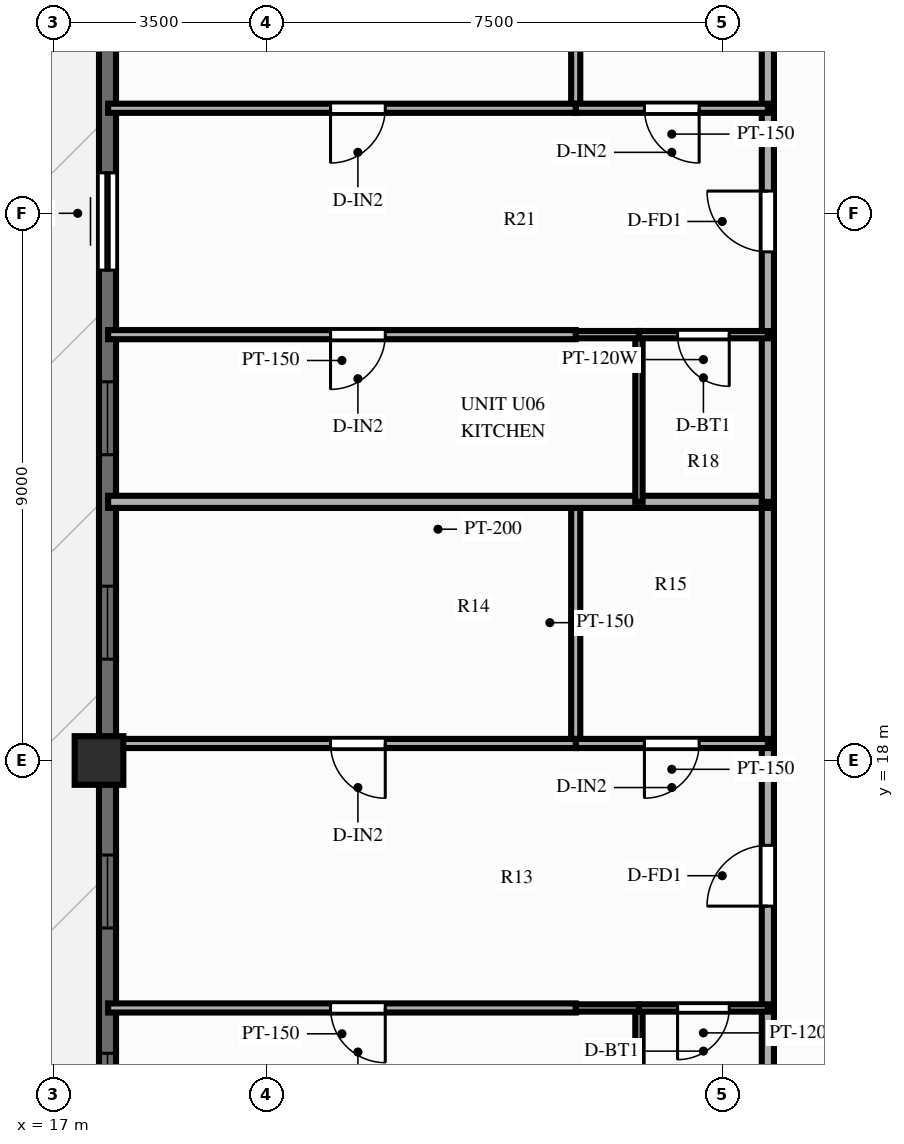
"""IFC4 building model, lengths in metres.
Left out: names, types, materials, properties, quantities, classifications, styles, units other than length and angle.
Written with IfcOpenShell. Run it as: python <this file> out.ifc"""

import sys

from ifc_helpers import new_model, si_unit, direction, frame, frame_2d, origin, origin_2d, place, context, subcontext, project, spatial, rectangle, extrude, source, transform, mapped, element, fill, save


model = new_model("IFC4")
c1 = context("Model", 3, precision=1e-05, world=origin(), true_north=direction((0.0, 1.0)))
c2 = subcontext(c1, "Body", "Model", "MODEL_VIEW")
j1 = project(units=[si_unit("LENGTHUNIT", "METRE"), si_unit("PLANEANGLEUNIT", "RADIAN")], contexts=[c1])
p1 = place(None, origin())
s1 = spatial("IfcSite", under=j1, at=p1, CompositionType="ELEMENT")
p2 = place(p1, origin())
s2 = spatial("IfcBuilding", under=s1, at=p2, CompositionType="ELEMENT")
p3 = place(p2, frame((0.0, 0.0, 179.8)))
s3 = spatial("IfcBuildingStorey", under=s2, at=p3, CompositionType="ELEMENT", Elevation=179.8)
m1 = source(origin(), c2, "Body", "SweptSolid", [
    extrude(rectangle(XDim=0.8, YDim=0.8, at=origin_2d()), origin(), (0.0, 0.0, 1.0), 3.0),
])
p4 = place(p3, frame((17.75, 18.0, 0.0), z_axis=(0.0, 0.0, 1.0), x_axis=(1.0, 0.0, 0.0)))
e1 = element("IfcColumn", 1, at=p4, inside=s3, PredefinedType="COLUMN", context=c2, shape_type="MappedRepresentation", body=[
    mapped(m1, transform((0.0, 0.0, 0.0), scale=1.0)),
])
p5 = place(p3, frame((17.89, 11.0, 0.0), z_axis=(0.0, 0.0, 1.0), x_axis=(0.0, 1.0, 0.0)))
e2 = element("IfcWall", 2, at=p5, inside=s3, PredefinedType="SOLIDWALL", context=c2, shape_type="SweptSolid", body=[
    extrude(rectangle(XDim=32.0, YDim=0.28, at=frame_2d((16.0, 0.0))), origin(), (0.0, 0.0, 1.0), 2.28),
])
p6 = place(p5, frame((0.985, 0.0, 0.25)))
e3 = element("IfcOpeningElement", 3, at=p6, cuts=e2, PredefinedType="OPENING", context=c2, shape_type="SweptSolid", body=[
    extrude(rectangle(XDim=1.2, YDim=1.5, at=frame_2d((0.6, 0.75))), frame((0.0, 0.152, 0.0), z_axis=(0.0, -1.0, 0.0), x_axis=(1.0, 0.0, 0.0)), (0.0, 0.0, 1.0), 0.304),
])
p7 = place(p5, frame((4.245, 0.0, 0.25)))
e4 = element("IfcOpeningElement", 4, at=p7, cuts=e2, PredefinedType="OPENING", context=c2, shape_type="SweptSolid", body=[
    extrude(rectangle(XDim=1.2, YDim=1.5, at=frame_2d((0.6, 0.75))), frame((0.0, 0.152, 0.0), z_axis=(0.0, -1.0, 0.0), x_axis=(1.0, 0.0, 0.0)), (0.0, 0.0, 1.0), 0.304),
])
p8 = place(p5, frame((8.667, 0.0, 0.25)))
e5 = element("IfcOpeningElement", 5, at=p8, cuts=e2, PredefinedType="OPENING", context=c2, shape_type="SweptSolid", body=[
    extrude(rectangle(XDim=1.2, YDim=1.5, at=frame_2d((0.6, 0.75))), frame((0.0, 0.152, 0.0), z_axis=(0.0, -1.0, 0.0), x_axis=(1.0, 0.0, 0.0)), (0.0, 0.0, 1.0), 0.304),
])
p9 = place(p5, frame((12.029, 0.0, 0.25)))
e6 = element("IfcOpeningElement", 6, at=p9, cuts=e2, PredefinedType="OPENING", context=c2, shape_type="SweptSolid", body=[
    extrude(rectangle(XDim=1.2, YDim=1.5, at=frame_2d((0.6, 0.75))), frame((0.0, 0.152, 0.0), z_axis=(0.0, -1.0, 0.0), x_axis=(1.0, 0.0, 0.0)), (0.0, 0.0, 1.0), 0.304),
])
p10 = place(p5, frame((15.066, 0.0, 0.0)))
e7 = element("IfcOpeningElement", 7, at=p10, cuts=e2, PredefinedType="OPENING", context=c2, shape_type="SweptSolid", body=[
    extrude(rectangle(XDim=1.6, YDim=2.15, at=frame_2d((0.8, 1.075))), frame((0.0, 0.152, 0.0), z_axis=(0.0, -1.0, 0.0), x_axis=(1.0, 0.0, 0.0)), (0.0, 0.0, 1.0), 0.304),
])
p11 = place(p5, frame((19.111, 0.0, 0.25)))
e8 = element("IfcOpeningElement", 8, at=p11, cuts=e2, PredefinedType="OPENING", context=c2, shape_type="SweptSolid", body=[
    extrude(rectangle(XDim=1.2, YDim=1.5, at=frame_2d((0.6, 0.75))), frame((0.0, 0.152, 0.0), z_axis=(0.0, -1.0, 0.0), x_axis=(1.0, 0.0, 0.0)), (0.0, 0.0, 1.0), 0.304),
])
p12 = place(p5, frame((22.47, 0.0, 0.25)))
e9 = element("IfcOpeningElement", 9, at=p12, cuts=e2, PredefinedType="OPENING", context=c2, shape_type="SweptSolid", body=[
    extrude(rectangle(XDim=1.2, YDim=1.5, at=frame_2d((0.6, 0.75))), frame((0.0, 0.152, 0.0), z_axis=(0.0, -1.0, 0.0), x_axis=(1.0, 0.0, 0.0)), (0.0, 0.0, 1.0), 0.304),
])
p13 = place(p5, frame((26.006, 0.0, 0.25)))
e10 = element("IfcOpeningElement", 10, at=p13, cuts=e2, PredefinedType="OPENING", context=c2, shape_type="SweptSolid", body=[
    extrude(rectangle(XDim=1.2, YDim=1.5, at=frame_2d((0.6, 0.75))), frame((0.0, 0.152, 0.0), z_axis=(0.0, -1.0, 0.0), x_axis=(1.0, 0.0, 0.0)), (0.0, 0.0, 1.0), 0.304),
])
p14 = place(p5, frame((29.266, 0.0, 0.25)))
e11 = element("IfcOpeningElement", 11, at=p14, cuts=e2, PredefinedType="OPENING", context=c2, shape_type="SweptSolid", body=[
    extrude(rectangle(XDim=1.2, YDim=1.5, at=frame_2d((0.6, 0.75))), frame((0.0, 0.152, 0.0), z_axis=(0.0, -1.0, 0.0), x_axis=(1.0, 0.0, 0.0)), (0.0, 0.0, 1.0), 0.304),
])
p15 = place(p3, frame((28.75, 11.18, 0.0), z_axis=(0.0, 0.0, 1.0), x_axis=(0.0, 1.0, 0.0)))
e12 = element("IfcWall", 12, at=p15, inside=s3, PredefinedType="PARTITIONING", context=c2, shape_type="SweptSolid", body=[
    extrude(rectangle(XDim=2.75, YDim=0.2, at=frame_2d((1.375, 0.0))), origin(), (0.0, 0.0, 1.0), 2.79),
])
p16 = place(p3, frame((28.75, 13.93, 0.0), z_axis=(0.0, 0.0, 1.0), x_axis=(0.0, 1.0, 0.0)))
e13 = element("IfcWall", 13, at=p16, inside=s3, PredefinedType="PARTITIONING", context=c2, shape_type="SweptSolid", body=[
    extrude(rectangle(XDim=4.35, YDim=0.2, at=frame_2d((2.175, 0.0))), origin(), (0.0, 0.0, 1.0), 2.79),
])
p17 = place(p16, frame((1.675, 0.0, 0.0)))
e14 = element("IfcOpeningElement", 14, at=p17, cuts=e13, PredefinedType="OPENING", context=c2, shape_type="SweptSolid", body=[
    extrude(rectangle(XDim=1.0, YDim=2.15, at=frame_2d((0.5, 1.075))), frame((0.0, 0.112, 0.0), z_axis=(0.0, -1.0, 0.0), x_axis=(1.0, 0.0, 0.0)), (0.0, 0.0, 1.0), 0.224),
])
p18 = place(p3, frame((28.75, 18.28, 0.0), z_axis=(0.0, 0.0, 1.0), x_axis=(0.0, 1.0, 0.0)))
e15 = element("IfcWall", 15, at=p18, inside=s3, PredefinedType="PARTITIONING", context=c2, shape_type="SweptSolid", body=[
    extrude(rectangle(XDim=3.974, YDim=0.2, at=frame_2d((1.987, 0.0))), origin(), (0.0, 0.0, 1.0), 2.79),
])
p19 = place(p3, frame((26.63, 11.18, 0.0), z_axis=(0.0, 0.0, 1.0), x_axis=(0.0, 1.0, 0.0)))
e16 = element("IfcWall", 16, at=p19, inside=s3, PredefinedType="PARTITIONING", context=c2, shape_type="SweptSolid", body=[
    extrude(rectangle(XDim=2.75, YDim=0.12, at=frame_2d((1.375, 0.0))), origin(), (0.0, 0.0, 1.0), 2.79),
])
p20 = place(p3, frame((25.59, 18.28, 0.0), z_axis=(0.0, 0.0, 1.0), x_axis=(0.0, 1.0, 0.0)))
e17 = element("IfcWall", 17, at=p20, inside=s3, PredefinedType="PARTITIONING", context=c2, shape_type="SweptSolid", body=[
    extrude(rectangle(XDim=3.974, YDim=0.15, at=frame_2d((1.987, 0.0))), origin(), (0.0, 0.0, 1.0), 2.79),
])
p21 = place(p3, frame((28.75, 13.93, 0.0), z_axis=(0.0, 0.0, 1.0), x_axis=(-1.0, 0.0, 0.0)))
e18 = element("IfcWall", 18, at=p21, inside=s3, PredefinedType="PARTITIONING", context=c2, shape_type="SweptSolid", body=[
    extrude(rectangle(XDim=2.12, YDim=0.12, at=frame_2d((1.06, 0.0))), origin(), (0.0, 0.0, 1.0), 2.79),
])
p22 = place(p21, frame((0.635, 0.0, 0.0)))
e19 = element("IfcOpeningElement", 19, at=p22, cuts=e18, PredefinedType="OPENING", context=c2, shape_type="SweptSolid", body=[
    extrude(rectangle(XDim=0.85, YDim=2.05, at=frame_2d((0.425, 1.025))), frame((0.0, 0.072, 0.0), z_axis=(0.0, -1.0, 0.0), x_axis=(1.0, 0.0, 0.0)), (0.0, 0.0, 1.0), 0.144),
])
p23 = place(p3, frame((26.63, 13.93, 0.0), z_axis=(0.0, 0.0, 1.0), x_axis=(-1.0, 0.0, 0.0)))
e20 = element("IfcWall", 20, at=p23, inside=s3, PredefinedType="PARTITIONING", context=c2, shape_type="SweptSolid", body=[
    extrude(rectangle(XDim=1.04, YDim=0.12, at=frame_2d((0.52, 0.0))), origin(), (0.0, 0.0, 1.0), 2.79),
])
p24 = place(p3, frame((25.59, 13.93, 0.0), z_axis=(0.0, 0.0, 1.0), x_axis=(-1.0, 0.0, 0.0)))
e21 = element("IfcWall", 21, at=p24, inside=s3, PredefinedType="PARTITIONING", context=c2, shape_type="SweptSolid", body=[
    extrude(rectangle(XDim=7.69, YDim=0.15, at=frame_2d((3.845, 0.0))), origin(), (0.0, 0.0, 1.0), 2.79),
])
p25 = place(p24, frame((3.132, 0.0, 0.0)))
e22 = element("IfcOpeningElement", 22, at=p25, cuts=e21, PredefinedType="OPENING", context=c2, shape_type="SweptSolid", body=[
    extrude(rectangle(XDim=0.9, YDim=2.1, at=frame_2d((0.45, 1.05))), frame((0.0, 0.087, 0.0), z_axis=(0.0, -1.0, 0.0), x_axis=(1.0, 0.0, 0.0)), (0.0, 0.0, 1.0), 0.174),
])
p26 = place(p3, frame((28.75, 18.28, 0.0), z_axis=(0.0, 0.0, 1.0), x_axis=(-1.0, 0.0, 0.0)))
e23 = element("IfcWall", 23, at=p26, inside=s3, PredefinedType="PARTITIONING", context=c2, shape_type="SweptSolid", body=[
    extrude(rectangle(XDim=3.16, YDim=0.15, at=frame_2d((1.58, 0.0))), origin(), (0.0, 0.0, 1.0), 2.79),
])
p27 = place(p26, frame((1.13, 0.0, 0.0)))
e24 = element("IfcOpeningElement", 24, at=p27, cuts=e23, PredefinedType="OPENING", context=c2, shape_type="SweptSolid", body=[
    extrude(rectangle(XDim=0.9, YDim=2.1, at=frame_2d((0.45, 1.05))), frame((0.0, 0.087, 0.0), z_axis=(0.0, -1.0, 0.0), x_axis=(1.0, 0.0, 0.0)), (0.0, 0.0, 1.0), 0.174),
])
p28 = place(p3, frame((25.59, 18.28, 0.0), z_axis=(0.0, 0.0, 1.0), x_axis=(-1.0, 0.0, 0.0)))
e25 = element("IfcWall", 25, at=p28, inside=s3, PredefinedType="PARTITIONING", context=c2, shape_type="SweptSolid", body=[
    extrude(rectangle(XDim=7.69, YDim=0.15, at=frame_2d((3.845, 0.0))), origin(), (0.0, 0.0, 1.0), 2.79),
])
p29 = place(p28, frame((3.132, 0.0, 0.0)))
e26 = element("IfcOpeningElement", 26, at=p29, cuts=e25, PredefinedType="OPENING", context=c2, shape_type="SweptSolid", body=[
    extrude(rectangle(XDim=0.9, YDim=2.1, at=frame_2d((0.45, 1.05))), frame((0.0, 0.087, 0.0), z_axis=(0.0, -1.0, 0.0), x_axis=(1.0, 0.0, 0.0)), (0.0, 0.0, 1.0), 0.174),
])
p30 = place(p3, frame((28.75, 22.254, 0.0), z_axis=(0.0, 0.0, 1.0), x_axis=(-1.0, 0.0, 0.0)))
e27 = element("IfcWall", 27, at=p30, inside=s3, PredefinedType="PARTITIONING", context=c2, shape_type="SweptSolid", body=[
    extrude(rectangle(XDim=10.85, YDim=0.2, at=frame_2d((5.425, 0.0))), origin(), (0.0, 0.0, 1.0), 2.39),
])
p31 = place(p3, frame((28.75, 22.254, 0.0), z_axis=(0.0, 0.0, 1.0), x_axis=(0.0, 1.0, 0.0)))
e28 = element("IfcWall", 28, at=p31, inside=s3, PredefinedType="PARTITIONING", context=c2, shape_type="SweptSolid", body=[
    extrude(rectangle(XDim=2.75, YDim=0.2, at=frame_2d((1.375, 0.0))), origin(), (0.0, 0.0, 1.0), 2.79),
])
p32 = place(p3, frame((28.75, 25.004, 0.0), z_axis=(0.0, 0.0, 1.0), x_axis=(0.0, 1.0, 0.0)))
e29 = element("IfcWall", 29, at=p32, inside=s3, PredefinedType="PARTITIONING", context=c2, shape_type="SweptSolid", body=[
    extrude(rectangle(XDim=3.724, YDim=0.2, at=frame_2d((1.862, 0.0))), origin(), (0.0, 0.0, 1.0), 2.79),
])
p33 = place(p32, frame((1.362, 0.0, 0.0)))
e30 = element("IfcOpeningElement", 30, at=p33, cuts=e29, PredefinedType="OPENING", context=c2, shape_type="SweptSolid", body=[
    extrude(rectangle(XDim=1.0, YDim=2.15, at=frame_2d((0.5, 1.075))), frame((0.0, 0.112, 0.0), z_axis=(0.0, -1.0, 0.0), x_axis=(1.0, 0.0, 0.0)), (0.0, 0.0, 1.0), 0.224),
])
p34 = place(p3, frame((28.75, 28.728, 0.0), z_axis=(0.0, 0.0, 1.0), x_axis=(0.0, 1.0, 0.0)))
e31 = element("IfcWall", 31, at=p34, inside=s3, PredefinedType="PARTITIONING", context=c2, shape_type="SweptSolid", body=[
    extrude(rectangle(XDim=3.968, YDim=0.2, at=frame_2d((1.984, 0.0))), origin(), (0.0, 0.0, 1.0), 2.79),
])
p35 = place(p3, frame((26.63, 22.254, 0.0), z_axis=(0.0, 0.0, 1.0), x_axis=(0.0, 1.0, 0.0)))
e32 = element("IfcWall", 32, at=p35, inside=s3, PredefinedType="PARTITIONING", context=c2, shape_type="SweptSolid", body=[
    extrude(rectangle(XDim=2.75, YDim=0.12, at=frame_2d((1.375, 0.0))), origin(), (0.0, 0.0, 1.0), 2.79),
])
p36 = place(p3, frame((25.59, 28.728, 0.0), z_axis=(0.0, 0.0, 1.0), x_axis=(0.0, 1.0, 0.0)))
e33 = element("IfcWall", 33, at=p36, inside=s3, PredefinedType="PARTITIONING", context=c2, shape_type="SweptSolid", body=[
    extrude(rectangle(XDim=3.968, YDim=0.15, at=frame_2d((1.984, 0.0))), origin(), (0.0, 0.0, 1.0), 2.79),
])
p37 = place(p3, frame((28.75, 25.004, 0.0), z_axis=(0.0, 0.0, 1.0), x_axis=(-1.0, 0.0, 0.0)))
e34 = element("IfcWall", 34, at=p37, inside=s3, PredefinedType="PARTITIONING", context=c2, shape_type="SweptSolid", body=[
    extrude(rectangle(XDim=2.12, YDim=0.12, at=frame_2d((1.06, 0.0))), origin(), (0.0, 0.0, 1.0), 2.79),
])
p38 = place(p37, frame((0.635, 0.0, 0.0)))
e35 = element("IfcOpeningElement", 35, at=p38, cuts=e34, PredefinedType="OPENING", context=c2, shape_type="SweptSolid", body=[
    extrude(rectangle(XDim=0.85, YDim=2.05, at=frame_2d((0.425, 1.025))), frame((0.0, 0.072, 0.0), z_axis=(0.0, -1.0, 0.0), x_axis=(1.0, 0.0, 0.0)), (0.0, 0.0, 1.0), 0.144),
])
p39 = place(p3, frame((26.63, 25.004, 0.0), z_axis=(0.0, 0.0, 1.0), x_axis=(-1.0, 0.0, 0.0)))
e36 = element("IfcWall", 36, at=p39, inside=s3, PredefinedType="PARTITIONING", context=c2, shape_type="SweptSolid", body=[
    extrude(rectangle(XDim=1.04, YDim=0.12, at=frame_2d((0.52, 0.0))), origin(), (0.0, 0.0, 1.0), 2.79),
])
p40 = place(p3, frame((25.59, 25.004, 0.0), z_axis=(0.0, 0.0, 1.0), x_axis=(-1.0, 0.0, 0.0)))
e37 = element("IfcWall", 37, at=p40, inside=s3, PredefinedType="PARTITIONING", context=c2, shape_type="SweptSolid", body=[
    extrude(rectangle(XDim=7.69, YDim=0.15, at=frame_2d((3.845, 0.0))), origin(), (0.0, 0.0, 1.0), 2.79),
])
p41 = place(p40, frame((3.132, 0.0, 0.0)))
e38 = element("IfcOpeningElement", 38, at=p41, cuts=e37, PredefinedType="OPENING", context=c2, shape_type="SweptSolid", body=[
    extrude(rectangle(XDim=0.9, YDim=2.1, at=frame_2d((0.45, 1.05))), frame((0.0, 0.087, 0.0), z_axis=(0.0, -1.0, 0.0), x_axis=(1.0, 0.0, 0.0)), (0.0, 0.0, 1.0), 0.174),
])
p42 = place(p3, frame((28.75, 28.728, 0.0), z_axis=(0.0, 0.0, 1.0), x_axis=(-1.0, 0.0, 0.0)))
e39 = element("IfcWall", 39, at=p42, inside=s3, PredefinedType="PARTITIONING", context=c2, shape_type="SweptSolid", body=[
    extrude(rectangle(XDim=3.16, YDim=0.15, at=frame_2d((1.58, 0.0))), origin(), (0.0, 0.0, 1.0), 2.79),
])
p43 = place(p42, frame((1.13, 0.0, 0.0)))
e40 = element("IfcOpeningElement", 40, at=p43, cuts=e39, PredefinedType="OPENING", context=c2, shape_type="SweptSolid", body=[
    extrude(rectangle(XDim=0.9, YDim=2.1, at=frame_2d((0.45, 1.05))), frame((0.0, 0.087, 0.0), z_axis=(0.0, -1.0, 0.0), x_axis=(1.0, 0.0, 0.0)), (0.0, 0.0, 1.0), 0.174),
])
p44 = place(p3, frame((25.59, 28.728, 0.0), z_axis=(0.0, 0.0, 1.0), x_axis=(-1.0, 0.0, 0.0)))
e41 = element("IfcWall", 41, at=p44, inside=s3, PredefinedType="PARTITIONING", context=c2, shape_type="SweptSolid", body=[
    extrude(rectangle(XDim=7.69, YDim=0.15, at=frame_2d((3.845, 0.0))), origin(), (0.0, 0.0, 1.0), 2.79),
])
p45 = place(p44, frame((3.132, 0.0, 0.0)))
e42 = element("IfcOpeningElement", 42, at=p45, cuts=e41, PredefinedType="OPENING", context=c2, shape_type="SweptSolid", body=[
    extrude(rectangle(XDim=0.9, YDim=2.1, at=frame_2d((0.45, 1.05))), frame((0.0, 0.087, 0.0), z_axis=(0.0, -1.0, 0.0), x_axis=(1.0, 0.0, 0.0)), (0.0, 0.0, 1.0), 0.174),
])
m2 = source(origin(), c2, "Body", "SweptSolid", [
    extrude(rectangle(XDim=1.2, YDim=1.5, at=frame_2d((0.6, 0.75))), frame((0.0, 0.03, 0.0), z_axis=(0.0, -1.0, 0.0), x_axis=(1.0, 0.0, 0.0)), (0.0, 0.0, 1.0), 0.06),
])
p46 = place(p6, origin())
e43 = element("IfcWindow", 43, at=p46, inside=s3, PartitioningType="SINGLE_PANEL", PredefinedType="WINDOW", context=c2, shape_type="MappedRepresentation", body=[
    mapped(m2, transform((0.0, 0.0, 0.0), scale=1.0)),
])
fill(e3, e43)
p47 = place(p7, origin())
e44 = element("IfcWindow", 44, at=p47, inside=s3, PartitioningType="SINGLE_PANEL", PredefinedType="WINDOW", context=c2, shape_type="MappedRepresentation", body=[
    mapped(m2, transform((0.0, 0.0, 0.0), scale=1.0)),
])
fill(e4, e44)
p48 = place(p8, origin())
e45 = element("IfcWindow", 45, at=p48, inside=s3, PartitioningType="SINGLE_PANEL", PredefinedType="WINDOW", context=c2, shape_type="MappedRepresentation", body=[
    mapped(m2, transform((0.0, 0.0, 0.0), scale=1.0)),
])
fill(e5, e45)
p49 = place(p9, origin())
e46 = element("IfcWindow", 46, at=p49, inside=s3, PartitioningType="SINGLE_PANEL", PredefinedType="WINDOW", context=c2, shape_type="MappedRepresentation", body=[
    mapped(m2, transform((0.0, 0.0, 0.0), scale=1.0)),
])
fill(e6, e46)
m3 = source(origin(), c2, "Body", "SweptSolid", [
    extrude(rectangle(XDim=1.6, YDim=2.15, at=frame_2d((0.8, 1.075))), frame((0.0, 0.025, 0.0), z_axis=(0.0, -1.0, 0.0), x_axis=(1.0, 0.0, 0.0)), (0.0, 0.0, 1.0), 0.05),
])
p50 = place(p10, origin())
e47 = element("IfcDoor", 47, at=p50, inside=s3, OperationType="SLIDING_TO_LEFT", PredefinedType="DOOR", context=c2, shape_type="MappedRepresentation", body=[
    mapped(m3, transform((0.0, 0.0, 0.0), scale=1.0)),
])
fill(e7, e47)
m4 = source(origin(), c2, "Body", "SweptSolid", [
    extrude(rectangle(XDim=1.0, YDim=2.15, at=frame_2d((0.5, 1.075))), frame((0.0, 0.025, 0.0), z_axis=(0.0, -1.0, 0.0), x_axis=(1.0, 0.0, 0.0)), (0.0, 0.0, 1.0), 0.05),
])
p51 = place(p17, origin())
e48 = element("IfcDoor", 48, at=p51, inside=s3, OperationType="SINGLE_SWING_LEFT", PredefinedType="DOOR", context=c2, shape_type="MappedRepresentation", body=[
    mapped(m4, transform((0.0, 0.0, 0.0), scale=1.0)),
])
fill(e14, e48)
m5 = source(origin(), c2, "Body", "SweptSolid", [
    extrude(rectangle(XDim=0.85, YDim=2.05, at=frame_2d((0.425, 1.025))), frame((0.0, 0.025, 0.0), z_axis=(0.0, -1.0, 0.0), x_axis=(1.0, 0.0, 0.0)), (0.0, 0.0, 1.0), 0.05),
])
p52 = place(p22, origin())
e49 = element("IfcDoor", 49, at=p52, inside=s3, OperationType="SINGLE_SWING_RIGHT", PredefinedType="DOOR", context=c2, shape_type="MappedRepresentation", body=[
    mapped(m5, transform((0.0, 0.0, 0.0), scale=1.0)),
])
fill(e19, e49)
m6 = source(origin(), c2, "Body", "SweptSolid", [
    extrude(rectangle(XDim=0.9, YDim=2.1, at=frame_2d((0.45, 1.05))), frame((0.0, 0.025, 0.0), z_axis=(0.0, -1.0, 0.0), x_axis=(1.0, 0.0, 0.0)), (0.0, 0.0, 1.0), 0.05),
])
p53 = place(p25, origin())
e50 = element("IfcDoor", 50, at=p53, inside=s3, OperationType="SINGLE_SWING_LEFT", PredefinedType="DOOR", context=c2, shape_type="MappedRepresentation", body=[
    mapped(m6, transform((0.0, 0.0, 0.0), scale=1.0)),
])
fill(e22, e50)
p54 = place(p27, origin())
e51 = element("IfcDoor", 51, at=p54, inside=s3, OperationType="SINGLE_SWING_RIGHT", PredefinedType="DOOR", context=c2, shape_type="MappedRepresentation", body=[
    mapped(m6, transform((0.0, 0.0, 0.0), scale=1.0)),
])
fill(e24, e51)
p55 = place(p29, origin())
e52 = element("IfcDoor", 52, at=p55, inside=s3, OperationType="SINGLE_SWING_LEFT", PredefinedType="DOOR", context=c2, shape_type="MappedRepresentation", body=[
    mapped(m6, transform((0.0, 0.0, 0.0), scale=1.0)),
])
fill(e26, e52)
p56 = place(p33, origin())
e53 = element("IfcDoor", 53, at=p56, inside=s3, OperationType="SINGLE_SWING_RIGHT", PredefinedType="DOOR", context=c2, shape_type="MappedRepresentation", body=[
    mapped(m4, transform((0.0, 0.0, 0.0), scale=1.0)),
])
fill(e30, e53)
p57 = place(p38, origin())
e54 = element("IfcDoor", 54, at=p57, inside=s3, OperationType="SINGLE_SWING_LEFT", PredefinedType="DOOR", context=c2, shape_type="MappedRepresentation", body=[
    mapped(m5, transform((0.0, 0.0, 0.0), scale=1.0)),
])
fill(e35, e54)
p58 = place(p41, origin())
e55 = element("IfcDoor", 55, at=p58, inside=s3, OperationType="SINGLE_SWING_RIGHT", PredefinedType="DOOR", context=c2, shape_type="MappedRepresentation", body=[
    mapped(m6, transform((0.0, 0.0, 0.0), scale=1.0)),
])
fill(e38, e55)
p59 = place(p43, origin())
e56 = element("IfcDoor", 56, at=p59, inside=s3, OperationType="SINGLE_SWING_LEFT", PredefinedType="DOOR", context=c2, shape_type="MappedRepresentation", body=[
    mapped(m6, transform((0.0, 0.0, 0.0), scale=1.0)),
])
fill(e40, e56)
p60 = place(p45, origin())
e57 = element("IfcDoor", 57, at=p60, inside=s3, OperationType="SINGLE_SWING_RIGHT", PredefinedType="DOOR", context=c2, shape_type="MappedRepresentation", body=[
    mapped(m6, transform((0.0, 0.0, 0.0), scale=1.0)),
])
fill(e42, e57)
save(model, sys.argv[1])
